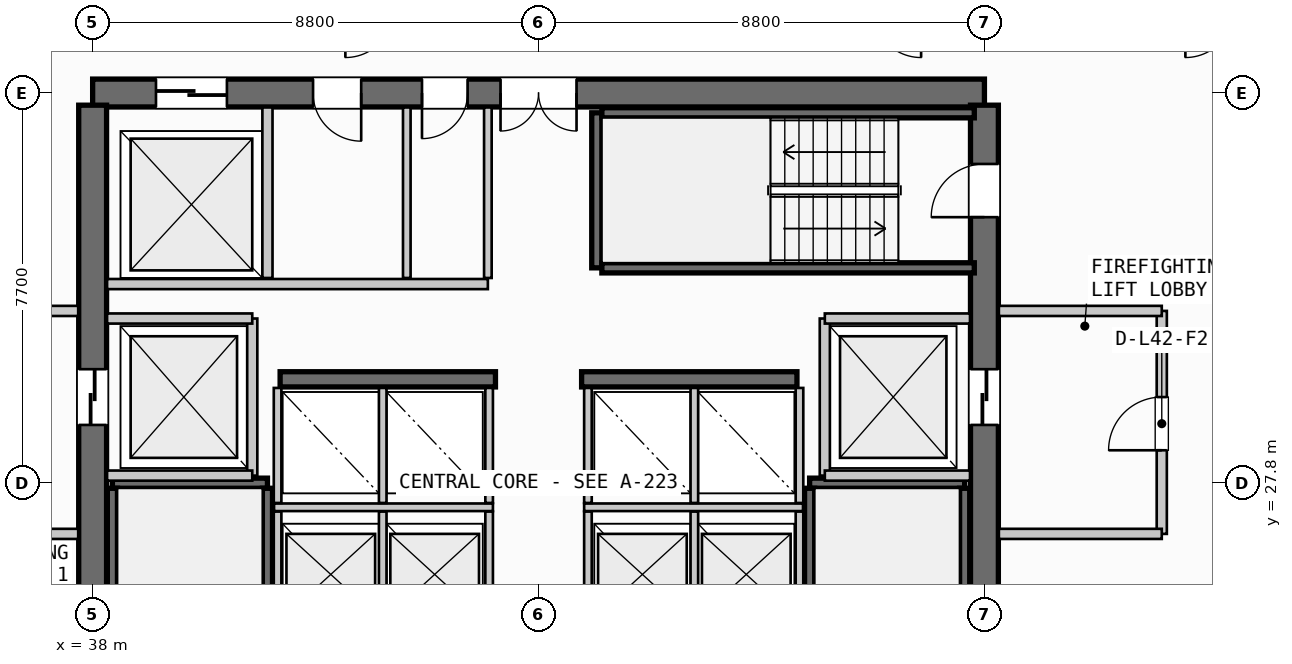
"""IFC4 building model, lengths in metres.
Left out: names, types, materials, properties, quantities, classifications, styles, units other than length and angle.
Written with IfcOpenShell. Run it as: python <this file> out.ifc"""

import sys

from ifc_helpers import new_model, si_unit, direction, frame, frame_2d, origin, place, context, subcontext, project, spatial, rectangle, extrude, source, transform, mapped, element, fill, save


model = new_model("IFC4")
c1 = context("Model", 3, precision=1e-05, world=origin(), true_north=direction((0.0, 1.0)))
c2 = subcontext(c1, "Body", "Model", "MODEL_VIEW")
j1 = project(units=[si_unit("LENGTHUNIT", "METRE"), si_unit("PLANEANGLEUNIT", "RADIAN")], contexts=[c1])
p1 = place(None, origin())
s1 = spatial("IfcSite", under=j1, at=p1, CompositionType="ELEMENT")
p2 = place(p1, origin())
s2 = spatial("IfcBuilding", under=s1, at=p2, CompositionType="ELEMENT")
p3 = place(p2, frame((0.0, 0.0, 164.3)))
s3 = spatial("IfcBuildingStorey", under=s2, at=p3, CompositionType="ELEMENT", Elevation=164.3)
p4 = place(p3, frame((55.6, 35.5, 0.0), z_axis=(0.0, 0.0, 1.0), x_axis=(-1.0, 0.0, 0.0)))
e1 = element("IfcWall", 1, at=p4, inside=s3, PredefinedType="SHEAR", context=c2, shape_type="SweptSolid", body=[
    extrude(rectangle(XDim=17.6, YDim=0.55, at=frame_2d((8.8, 0.0))), origin(), (0.0, 0.0, 1.0), 3.3),
])
p5 = place(p4, frame((8.05, 0.0, 0.0)))
e2 = element("IfcOpeningElement", 2, at=p5, cuts=e1, PredefinedType="OPENING", context=c2, shape_type="SweptSolid", body=[
    extrude(rectangle(XDim=1.5, YDim=2.2, at=frame_2d((0.75, 1.1))), frame((0.0, 0.285, 0.0), z_axis=(0.0, -1.0, 0.0), x_axis=(1.0, 0.0, 0.0)), (0.0, 0.0, 1.0), 0.57),
])
p6 = place(p4, frame((14.95, 0.0, 0.0)))
e3 = element("IfcOpeningElement", 3, at=p6, cuts=e1, PredefinedType="OPENING", context=c2, shape_type="SweptSolid", body=[
    extrude(rectangle(XDim=1.4, YDim=2.3, at=frame_2d((0.7, 1.15))), frame((0.0, 0.285, 0.0), z_axis=(0.0, -1.0, 0.0), x_axis=(1.0, 0.0, 0.0)), (0.0, 0.0, 1.0), 0.57),
])
p7 = place(p4, frame((12.3, 0.0, 0.0)))
e4 = element("IfcOpeningElement", 4, at=p7, cuts=e1, PredefinedType="OPENING", context=c2, shape_type="SweptSolid", body=[
    extrude(rectangle(XDim=0.95, YDim=2.15, at=frame_2d((0.475, 1.075))), frame((0.0, 0.285, 0.0), z_axis=(0.0, -1.0, 0.0), x_axis=(1.0, 0.0, 0.0)), (0.0, 0.0, 1.0), 0.57),
])
p8 = place(p4, frame((10.2, 0.0, 0.0)))
e5 = element("IfcOpeningElement", 5, at=p8, cuts=e1, PredefinedType="OPENING", context=c2, shape_type="SweptSolid", body=[
    extrude(rectangle(XDim=0.9, YDim=2.15, at=frame_2d((0.45, 1.075))), frame((0.0, 0.285, 0.0), z_axis=(0.0, -1.0, 0.0), x_axis=(1.0, 0.0, 0.0)), (0.0, 0.0, 1.0), 0.57),
])
p9 = place(p3, frame((38.0, 35.26, 0.0), z_axis=(0.0, 0.0, 1.0), x_axis=(0.0, -1.0, 0.0)))
e6 = element("IfcWall", 6, at=p9, inside=s3, PredefinedType="SHEAR", context=c2, shape_type="SweptSolid", body=[
    extrude(rectangle(XDim=14.92, YDim=0.55, at=frame_2d((7.46, 0.0))), origin(), (0.0, 0.0, 1.0), 3.3),
])
p10 = place(p9, frame((5.21, 0.0, 0.0)))
e7 = element("IfcOpeningElement", 7, at=p10, cuts=e6, PredefinedType="OPENING", context=c2, shape_type="SweptSolid", body=[
    extrude(rectangle(XDim=1.1, YDim=2.2, at=frame_2d((0.55, 1.1))), frame((0.0, 0.285, 0.0), z_axis=(0.0, -1.0, 0.0), x_axis=(1.0, 0.0, 0.0)), (0.0, 0.0, 1.0), 0.57),
])
p11 = place(p3, frame((55.6, 20.34, 0.0), z_axis=(0.0, 0.0, 1.0), x_axis=(0.0, 1.0, 0.0)))
e8 = element("IfcWall", 8, at=p11, inside=s3, PredefinedType="SHEAR", context=c2, shape_type="SweptSolid", body=[
    extrude(rectangle(XDim=14.92, YDim=0.55, at=frame_2d((7.46, 0.0))), origin(), (0.0, 0.0, 1.0), 3.3),
])
p12 = place(p11, frame((12.71, 0.0, 0.0)))
e9 = element("IfcOpeningElement", 9, at=p12, cuts=e8, PredefinedType="OPENING", context=c2, shape_type="SweptSolid", body=[
    extrude(rectangle(XDim=1.05, YDim=2.15, at=frame_2d((0.525, 1.075))), frame((0.0, 0.285, 0.0), z_axis=(0.0, -1.0, 0.0), x_axis=(1.0, 0.0, 0.0)), (0.0, 0.0, 1.0), 0.57),
])
p13 = place(p11, frame((8.61, 0.0, 0.0)))
e10 = element("IfcOpeningElement", 10, at=p13, cuts=e8, PredefinedType="OPENING", context=c2, shape_type="SweptSolid", body=[
    extrude(rectangle(XDim=1.1, YDim=2.2, at=frame_2d((0.55, 1.1))), frame((0.0, 0.285, 0.0), z_axis=(0.0, -1.0, 0.0), x_axis=(1.0, 0.0, 0.0)), (0.0, 0.0, 1.0), 0.57),
])
for number, where, z_axis, x_axis in (
    (11, (41.7, 29.85, 0.0), (0.0, 0.0, 1.0), (1.0, 0.0, 0.0)),
    (12, (47.65, 29.85, 0.0), (0.0, 0.0, 1.0), (1.0, 0.0, 0.0)),
):
    element("IfcWall", number, at=place(p3, frame(where, z_axis=z_axis, x_axis=x_axis)), inside=s3, PredefinedType="SHEAR", context=c2, shape_type="SweptSolid", body=[
        extrude(rectangle(XDim=4.25, YDim=0.3, at=frame_2d((2.125, 0.0))), origin(), (0.0, 0.0, 1.0), 3.3),
    ])
p14 = place(p3, frame((38.39, 27.8, 0.0), z_axis=(0.0, 0.0, 1.0), x_axis=(1.0, 0.0, 0.0)))
e13 = element("IfcWall", 13, at=p14, inside=s3, PredefinedType="SHEAR", context=c2, shape_type="SweptSolid", body=[
    extrude(rectangle(XDim=3.06, YDim=0.2, at=frame_2d((1.53, 0.0))), origin(), (0.0, 0.0, 1.0), 3.3),
])
for number, where, z_axis, x_axis in (
    (14, (41.45, 27.7, 0.0), (0.0, 0.0, 1.0), (0.0, -1.0, 0.0)),
    (15, (38.39, 20.35, 0.0), (0.0, 0.0, 1.0), (0.0, 1.0, 0.0)),
):
    element("IfcWall", number, at=place(p3, frame(where, z_axis=z_axis, x_axis=x_axis)), inside=s3, PredefinedType="SHEAR", context=c2, shape_type="SweptSolid", body=[
        extrude(rectangle(XDim=7.35, YDim=0.2, at=frame_2d((3.675, 0.0))), origin(), (0.0, 0.0, 1.0), 3.3),
    ])
p15 = place(p3, frame((52.15, 27.8, 0.0), z_axis=(0.0, 0.0, 1.0), x_axis=(1.0, 0.0, 0.0)))
e16 = element("IfcWall", 16, at=p15, inside=s3, PredefinedType="SHEAR", context=c2, shape_type="SweptSolid", body=[
    extrude(rectangle(XDim=3.06, YDim=0.2, at=frame_2d((1.53, 0.0))), origin(), (0.0, 0.0, 1.0), 3.3),
])
for number, where, z_axis, x_axis in (
    (17, (55.21, 27.7, 0.0), (0.0, 0.0, 1.0), (0.0, -1.0, 0.0)),
    (18, (52.15, 20.35, 0.0), (0.0, 0.0, 1.0), (0.0, 1.0, 0.0)),
):
    element("IfcWall", number, at=place(p3, frame(where, z_axis=z_axis, x_axis=x_axis)), inside=s3, PredefinedType="SHEAR", context=c2, shape_type="SweptSolid", body=[
        extrude(rectangle(XDim=7.35, YDim=0.2, at=frame_2d((3.675, 0.0))), origin(), (0.0, 0.0, 1.0), 3.3),
    ])
p16 = place(p3, frame((47.95, 32.05, 0.0), z_axis=(0.0, 0.0, 1.0), x_axis=(0.0, 1.0, 0.0)))
e19 = element("IfcWall", 19, at=p16, inside=s3, PredefinedType="SHEAR", context=c2, shape_type="SweptSolid", body=[
    extrude(rectangle(XDim=3.06, YDim=0.2, at=frame_2d((1.53, 0.0))), origin(), (0.0, 0.0, 1.0), 3.3),
])
for number, where, z_axis, x_axis in (
    (20, (48.05, 35.11, 0.0), (0.0, 0.0, 1.0), (1.0, 0.0, 0.0)),
    (21, (55.4, 32.05, 0.0), (0.0, 0.0, 1.0), (-1.0, 0.0, 0.0)),
):
    element("IfcWall", number, at=place(p3, frame(where, z_axis=z_axis, x_axis=x_axis)), inside=s3, PredefinedType="SHEAR", context=c2, shape_type="SweptSolid", body=[
        extrude(rectangle(XDim=7.35, YDim=0.2, at=frame_2d((3.675, 0.0))), origin(), (0.0, 0.0, 1.0), 3.3),
    ])
p17 = place(p3, frame((41.15, 27.95, 0.0), z_axis=(0.0, 0.0, 1.0), x_axis=(0.0, 1.0, 0.0)))
e22 = element("IfcWall", 22, at=p17, inside=s3, PredefinedType="PARTITIONING", context=c2, shape_type="SweptSolid", body=[
    extrude(rectangle(XDim=3.1, YDim=0.2, at=frame_2d((1.55, 0.0))), origin(), (0.0, 0.0, 1.0), 2.28),
])
for number, where, z_axis, x_axis in (
    (23, (38.285, 27.95, 0.0), (0.0, 0.0, 1.0), (1.0, 0.0, 0.0)),
    (24, (38.285, 31.05, 0.0), (0.0, 0.0, 1.0), (1.0, 0.0, 0.0)),
):
    element("IfcWall", number, at=place(p3, frame(where, z_axis=z_axis, x_axis=x_axis)), inside=s3, PredefinedType="PARTITIONING", context=c2, shape_type="SweptSolid", body=[
        extrude(rectangle(XDim=2.865, YDim=0.2, at=frame_2d((1.433, 0.0))), origin(), (0.0, 0.0, 1.0), 2.28),
    ])
for number, where, z_axis, x_axis in (
    (25, (34.5, 26.8, 0.0), (0.0, 0.0, 1.0), (1.0, 0.0, 0.0)),
    (26, (34.5, 31.2, 0.0), (0.0, 0.0, 1.0), (1.0, 0.0, 0.0)),
):
    element("IfcWall", number, at=place(p3, frame(where, z_axis=z_axis, x_axis=x_axis)), inside=s3, PredefinedType="PARTITIONING", context=c2, shape_type="SweptSolid", body=[
        extrude(rectangle(XDim=3.215, YDim=0.2, at=frame_2d((1.607, 0.0))), origin(), (0.0, 0.0, 1.0), 2.28),
    ])
p18 = place(p3, frame((52.45, 27.95, 0.0), z_axis=(0.0, 0.0, 1.0), x_axis=(0.0, 1.0, 0.0)))
e27 = element("IfcWall", 27, at=p18, inside=s3, PredefinedType="PARTITIONING", context=c2, shape_type="SweptSolid", body=[
    extrude(rectangle(XDim=3.1, YDim=0.2, at=frame_2d((1.55, 0.0))), origin(), (0.0, 0.0, 1.0), 2.28),
])
for number, where, z_axis, x_axis in (
    (28, (52.45, 27.95, 0.0), (0.0, 0.0, 1.0), (1.0, 0.0, 0.0)),
    (29, (52.45, 31.05, 0.0), (0.0, 0.0, 1.0), (1.0, 0.0, 0.0)),
):
    element("IfcWall", number, at=place(p3, frame(where, z_axis=z_axis, x_axis=x_axis)), inside=s3, PredefinedType="PARTITIONING", context=c2, shape_type="SweptSolid", body=[
        extrude(rectangle(XDim=2.865, YDim=0.2, at=frame_2d((1.433, 0.0))), origin(), (0.0, 0.0, 1.0), 2.28),
    ])
p19 = place(p3, frame((59.1, 26.8, 0.0), z_axis=(0.0, 0.0, 1.0), x_axis=(0.0, 1.0, 0.0)))
e30 = element("IfcWall", 30, at=p19, inside=s3, PredefinedType="PARTITIONING", context=c2, shape_type="SweptSolid", body=[
    extrude(rectangle(XDim=4.4, YDim=0.2, at=frame_2d((2.2, 0.0))), origin(), (0.0, 0.0, 1.0), 2.28),
])
p20 = place(p19, frame((1.65, 0.0, 0.0)))
e31 = element("IfcOpeningElement", 31, at=p20, cuts=e30, PredefinedType="OPENING", context=c2, shape_type="SweptSolid", body=[
    extrude(rectangle(XDim=1.05, YDim=2.15, at=frame_2d((0.525, 1.075))), frame((0.0, 0.11, 0.0), z_axis=(0.0, -1.0, 0.0), x_axis=(1.0, 0.0, 0.0)), (0.0, 0.0, 1.0), 0.22),
])
for number, where, z_axis, x_axis in (
    (32, (55.885, 26.8, 0.0), (0.0, 0.0, 1.0), (1.0, 0.0, 0.0)),
    (33, (55.885, 31.2, 0.0), (0.0, 0.0, 1.0), (1.0, 0.0, 0.0)),
):
    element("IfcWall", number, at=place(p3, frame(where, z_axis=z_axis, x_axis=x_axis)), inside=s3, PredefinedType="PARTITIONING", context=c2, shape_type="SweptSolid", body=[
        extrude(rectangle(XDim=3.215, YDim=0.2, at=frame_2d((1.607, 0.0))), origin(), (0.0, 0.0, 1.0), 2.28),
    ])
p21 = place(p3, frame((41.58, 27.325, 0.0), z_axis=(0.0, 0.0, 1.0), x_axis=(1.0, 0.0, 0.0)))
e34 = element("IfcWall", 34, at=p21, inside=s3, PredefinedType="PARTITIONING", context=c2, shape_type="SweptSolid", body=[
    extrude(rectangle(XDim=4.32, YDim=0.15, at=frame_2d((2.16, 0.0))), origin(), (0.0, 0.0, 1.0), 2.28),
])
p22 = place(p3, frame((47.7, 27.325, 0.0), z_axis=(0.0, 0.0, 1.0), x_axis=(1.0, 0.0, 0.0)))
e35 = element("IfcWall", 35, at=p22, inside=s3, PredefinedType="PARTITIONING", context=c2, shape_type="SweptSolid", body=[
    extrude(rectangle(XDim=4.32, YDim=0.15, at=frame_2d((2.16, 0.0))), origin(), (0.0, 0.0, 1.0), 2.28),
])
for number, where, z_axis, x_axis in (
    (36, (41.65, 24.92, 0.0), (0.0, 0.0, 1.0), (0.0, 1.0, 0.0)),
    (37, (43.725, 24.92, 0.0), (0.0, 0.0, 1.0), (0.0, 1.0, 0.0)),
    (38, (45.825, 24.92, 0.0), (0.0, 0.0, 1.0), (0.0, 1.0, 0.0)),
    (39, (47.775, 24.92, 0.0), (0.0, 0.0, 1.0), (0.0, 1.0, 0.0)),
    (40, (49.875, 24.92, 0.0), (0.0, 0.0, 1.0), (0.0, 1.0, 0.0)),
    (41, (51.95, 24.92, 0.0), (0.0, 0.0, 1.0), (0.0, 1.0, 0.0)),
):
    element("IfcWall", number, at=place(p3, frame(where, z_axis=z_axis, x_axis=x_axis)), inside=s3, PredefinedType="PARTITIONING", context=c2, shape_type="SweptSolid", body=[
        extrude(rectangle(XDim=2.32, YDim=0.15, at=frame_2d((1.16, 0.0))), origin(), (0.0, 0.0, 1.0), 2.28),
    ])
for number, where, z_axis, x_axis in (
    (42, (41.65, 27.41, 0.0), (0.0, 0.0, 1.0), (0.0, 1.0, 0.0)),
    (43, (43.725, 27.41, 0.0), (0.0, 0.0, 1.0), (0.0, 1.0, 0.0)),
    (44, (45.825, 27.41, 0.0), (0.0, 0.0, 1.0), (0.0, 1.0, 0.0)),
    (45, (47.775, 27.41, 0.0), (0.0, 0.0, 1.0), (0.0, 1.0, 0.0)),
    (46, (49.875, 27.41, 0.0), (0.0, 0.0, 1.0), (0.0, 1.0, 0.0)),
    (47, (51.95, 27.41, 0.0), (0.0, 0.0, 1.0), (0.0, 1.0, 0.0)),
):
    element("IfcWall", number, at=place(p3, frame(where, z_axis=z_axis, x_axis=x_axis)), inside=s3, PredefinedType="PARTITIONING", context=c2, shape_type="SweptSolid", body=[
        extrude(rectangle(XDim=2.27, YDim=0.15, at=frame_2d((1.135, 0.0))), origin(), (0.0, 0.0, 1.0), 2.28),
    ])
p23 = place(p3, frame((41.45, 31.85, 0.0), z_axis=(0.0, 0.0, 1.0), x_axis=(0.0, 1.0, 0.0)))
e48 = element("IfcWall", 48, at=p23, inside=s3, PredefinedType="PARTITIONING", context=c2, shape_type="SweptSolid", body=[
    extrude(rectangle(XDim=3.365, YDim=0.2, at=frame_2d((1.683, 0.0))), origin(), (0.0, 0.0, 1.0), 2.28),
])
p24 = place(p3, frame((38.285, 31.73, 0.0), z_axis=(0.0, 0.0, 1.0), x_axis=(1.0, 0.0, 0.0)))
e49 = element("IfcWall", 49, at=p24, inside=s3, PredefinedType="PARTITIONING", context=c2, shape_type="SweptSolid", body=[
    extrude(rectangle(XDim=7.515, YDim=0.2, at=frame_2d((3.758, 0.0))), origin(), (0.0, 0.0, 1.0), 2.28),
])
p25 = place(p3, frame((45.8, 31.85, 0.0), z_axis=(0.0, 0.0, 1.0), x_axis=(0.0, 1.0, 0.0)))
e50 = element("IfcWall", 50, at=p25, inside=s3, PredefinedType="PARTITIONING", context=c2, shape_type="SweptSolid", body=[
    extrude(rectangle(XDim=3.365, YDim=0.15, at=frame_2d((1.683, 0.0))), origin(), (0.0, 0.0, 1.0), 2.28),
])
p26 = place(p3, frame((44.2, 31.85, 0.0), z_axis=(0.0, 0.0, 1.0), x_axis=(0.0, 1.0, 0.0)))
e51 = element("IfcWall", 51, at=p26, inside=s3, PredefinedType="PLUMBINGWALL", context=c2, shape_type="SweptSolid", body=[
    extrude(rectangle(XDim=3.365, YDim=0.15, at=frame_2d((1.683, 0.0))), origin(), (0.0, 0.0, 1.0), 2.28),
])
m1 = source(origin(), c2, "Body", "SweptSolid", [
    extrude(rectangle(XDim=1.05, YDim=2.15, at=frame_2d((0.525, 1.075))), frame((0.0, 0.025, 0.0), z_axis=(0.0, -1.0, 0.0), x_axis=(1.0, 0.0, 0.0)), (0.0, 0.0, 1.0), 0.05),
])
p27 = place(p12, origin())
e52 = element("IfcDoor", 52, at=p27, inside=s3, OperationType="SINGLE_SWING_LEFT", PredefinedType="DOOR", context=c2, shape_type="MappedRepresentation", body=[
    mapped(m1, transform((0.0, 0.0, 0.0), scale=1.0)),
])
fill(e9, e52)
m2 = source(origin(), c2, "Body", "SweptSolid", [
    extrude(rectangle(XDim=1.5, YDim=2.2, at=frame_2d((0.75, 1.1))), frame((0.0, 0.025, 0.0), z_axis=(0.0, -1.0, 0.0), x_axis=(1.0, 0.0, 0.0)), (0.0, 0.0, 1.0), 0.05),
])
p28 = place(p5, origin())
e53 = element("IfcDoor", 53, at=p28, inside=s3, OperationType="DOUBLE_DOOR_SINGLE_SWING", PredefinedType="DOOR", context=c2, shape_type="MappedRepresentation", body=[
    mapped(m2, transform((0.0, 0.0, 0.0), scale=1.0)),
])
fill(e2, e53)
m3 = source(origin(), c2, "Body", "SweptSolid", [
    extrude(rectangle(XDim=1.1, YDim=2.2, at=frame_2d((0.55, 1.1))), frame((0.0, 0.025, 0.0), z_axis=(0.0, -1.0, 0.0), x_axis=(1.0, 0.0, 0.0)), (0.0, 0.0, 1.0), 0.05),
])
p29 = place(p10, origin())
e54 = element("IfcDoor", 54, at=p29, inside=s3, OperationType="SLIDING_TO_LEFT", PredefinedType="DOOR", context=c2, shape_type="MappedRepresentation", body=[
    mapped(m3, transform((0.0, 0.0, 0.0), scale=1.0)),
])
fill(e7, e54)
p30 = place(p13, origin())
e55 = element("IfcDoor", 55, at=p30, inside=s3, OperationType="SLIDING_TO_RIGHT", PredefinedType="DOOR", context=c2, shape_type="MappedRepresentation", body=[
    mapped(m3, transform((0.0, 0.0, 0.0), scale=1.0)),
])
fill(e10, e55)
m4 = source(origin(), c2, "Body", "SweptSolid", [
    extrude(rectangle(XDim=1.4, YDim=2.3, at=frame_2d((0.7, 1.15))), frame((0.0, 0.025, 0.0), z_axis=(0.0, -1.0, 0.0), x_axis=(1.0, 0.0, 0.0)), (0.0, 0.0, 1.0), 0.05),
])
p31 = place(p6, origin())
e56 = element("IfcDoor", 56, at=p31, inside=s3, OperationType="SLIDING_TO_RIGHT", PredefinedType="DOOR", context=c2, shape_type="MappedRepresentation", body=[
    mapped(m4, transform((0.0, 0.0, 0.0), scale=1.0)),
])
fill(e3, e56)
m5 = source(origin(), c2, "Body", "SweptSolid", [
    extrude(rectangle(XDim=0.95, YDim=2.15, at=frame_2d((0.475, 1.075))), frame((0.0, 0.025, 0.0), z_axis=(0.0, -1.0, 0.0), x_axis=(1.0, 0.0, 0.0)), (0.0, 0.0, 1.0), 0.05),
])
p32 = place(p7, origin())
e57 = element("IfcDoor", 57, at=p32, inside=s3, OperationType="SINGLE_SWING_LEFT", PredefinedType="DOOR", context=c2, shape_type="MappedRepresentation", body=[
    mapped(m5, transform((0.0, 0.0, 0.0), scale=1.0)),
])
fill(e4, e57)
m6 = source(origin(), c2, "Body", "SweptSolid", [
    extrude(rectangle(XDim=0.9, YDim=2.15, at=frame_2d((0.45, 1.075))), frame((0.0, 0.025, 0.0), z_axis=(0.0, -1.0, 0.0), x_axis=(1.0, 0.0, 0.0)), (0.0, 0.0, 1.0), 0.05),
])
p33 = place(p8, origin())
e58 = element("IfcDoor", 58, at=p33, inside=s3, OperationType="SINGLE_SWING_RIGHT", PredefinedType="DOOR", context=c2, shape_type="MappedRepresentation", body=[
    mapped(m6, transform((0.0, 0.0, 0.0), scale=1.0)),
])
fill(e5, e58)
p34 = place(p20, origin())
e59 = element("IfcDoor", 59, at=p34, inside=s3, OperationType="SINGLE_SWING_LEFT", PredefinedType="DOOR", context=c2, shape_type="MappedRepresentation", body=[
    mapped(m1, transform((0.0, 0.0, 0.0), scale=1.0)),
])
fill(e31, e59)
save(model, sys.argv[1])
